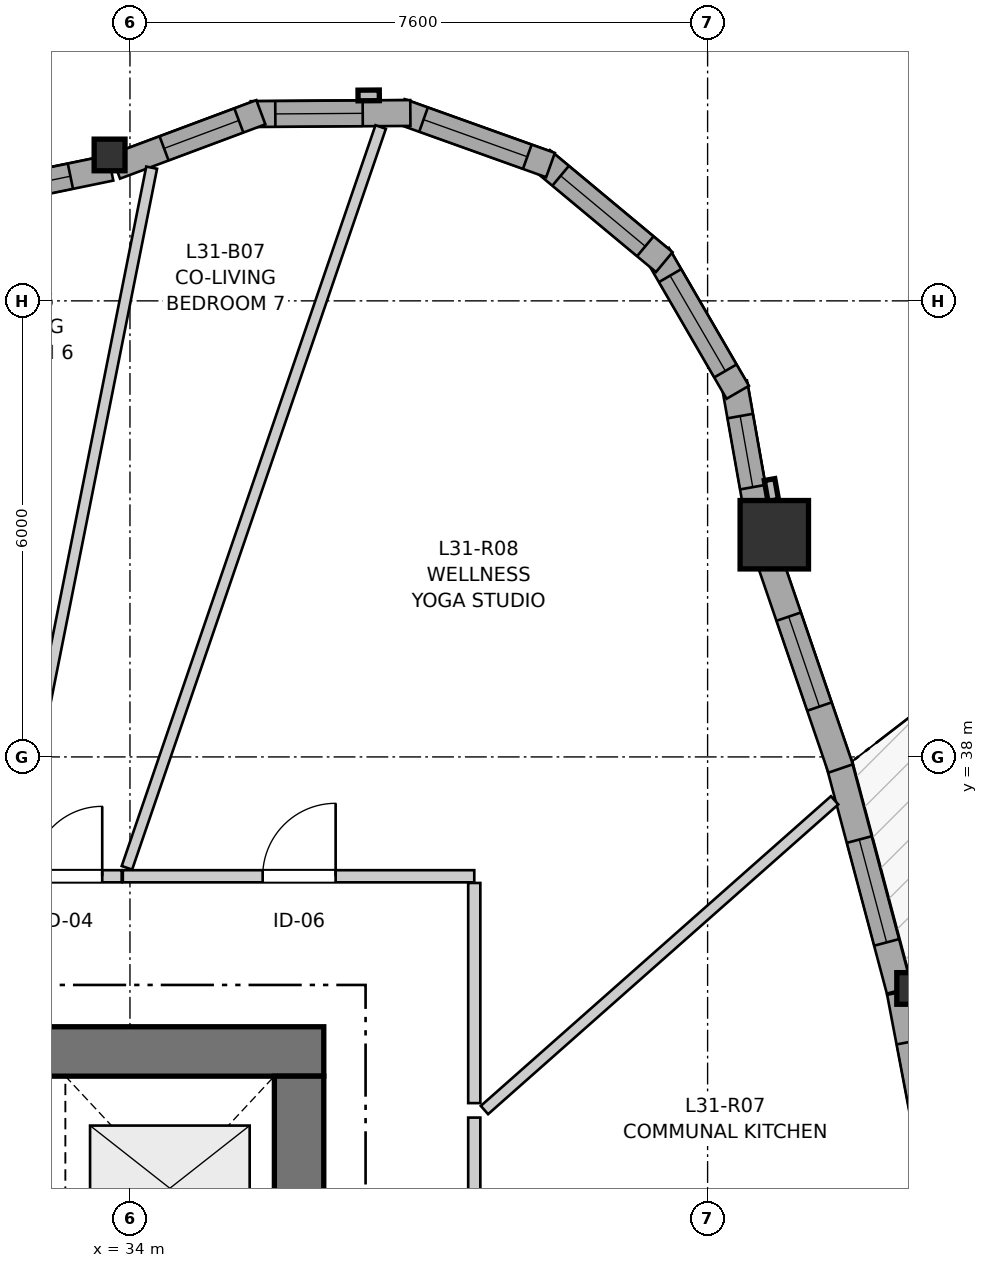
"""IFC4 building model, lengths in metres.
Left out: names, types, materials, properties, quantities, classifications, styles, units other than length and angle.
Written with IfcOpenShell. Run it as: python <this file> out.ifc"""

import sys

from ifc_helpers import new_model, si_unit, direction, frame, frame_2d, origin, origin_2d, place, context, subcontext, project, spatial, rectangle, i_section, extrude, source, transform, mapped, element, fill, save


model = new_model("IFC4")
c1 = context("Model", 3, precision=1e-05, world=origin(), true_north=direction((0.0, 1.0)))
c2 = subcontext(c1, "Body", "Model", "MODEL_VIEW")
j1 = project(units=[si_unit("LENGTHUNIT", "METRE"), si_unit("PLANEANGLEUNIT", "RADIAN")], contexts=[c1])
p1 = place(None, origin())
s1 = spatial("IfcSite", under=j1, at=p1, CompositionType="ELEMENT")
p2 = place(p1, origin())
s2 = spatial("IfcBuilding", under=s1, at=p2, CompositionType="ELEMENT")
p3 = place(p2, frame((0.0, 0.0, 105.6)))
s3 = spatial("IfcBuildingStorey", under=s2, at=p3, CompositionType="ELEMENT", Elevation=105.6)
p4 = place(p3, frame((36.55, 34.125, 0.0), z_axis=(0.0, 0.0, 1.0), x_axis=(-1.0, 0.0, 0.0)))
e1 = element("IfcWall", 1, at=p4, inside=s3, PredefinedType="SHEAR", context=c2, shape_type="SweptSolid", body=[
    extrude(rectangle(XDim=12.4, YDim=0.65, at=frame_2d((6.2, 0.0))), origin(), (0.0, 0.0, 1.0), 2.935),
])
p5 = place(p3, frame((36.225, 18.2, 0.0), z_axis=(0.0, 0.0, 1.0), x_axis=(0.0, 1.0, 0.0)))
e2 = element("IfcWall", 2, at=p5, inside=s3, PredefinedType="SHEAR", context=c2, shape_type="SweptSolid", body=[
    extrude(rectangle(XDim=15.6, YDim=0.65, at=frame_2d((7.8, 0.0))), origin(), (0.0, 0.0, 1.0), 2.935),
])
p6 = place(p5, frame((4.25, 0.0, 0.0)))
e3 = element("IfcOpeningElement", 3, at=p6, cuts=e2, PredefinedType="OPENING", context=c2, shape_type="SweptSolid", body=[
    extrude(rectangle(XDim=1.1, YDim=2.15, at=frame_2d((0.55, 1.075))), frame((0.0, 0.335, 0.0), z_axis=(0.0, -1.0, 0.0), x_axis=(1.0, 0.0, 0.0)), (0.0, 0.0, 1.0), 0.67),
])
p7 = place(p5, frame((10.25, 0.0, 0.0)))
e4 = element("IfcOpeningElement", 4, at=p7, cuts=e2, PredefinedType="OPENING", context=c2, shape_type="SweptSolid", body=[
    extrude(rectangle(XDim=1.1, YDim=2.15, at=frame_2d((0.55, 1.075))), frame((0.0, 0.335, 0.0), z_axis=(0.0, -1.0, 0.0), x_axis=(1.0, 0.0, 0.0)), (0.0, 0.0, 1.0), 0.67),
])
m1 = source(origin(), c2, "Body", "SweptSolid", [
    extrude(i_section(OverallWidth=0.406, OverallDepth=0.416, WebThickness=0.027, FlangeThickness=0.044, FilletRadius=0.015, at=origin_2d()), origin(), (0.0, 0.0, 1.0), 2.935),
])
p8 = place(p3, frame((44.292, 34.954, 0.0), z_axis=(0.0, 0.0, 1.0), x_axis=(1.0, 0.0, 0.0)))
e5 = element("IfcColumn", 5, at=p8, inside=s3, PredefinedType="PILASTER", context=c2, shape_type="MappedRepresentation", body=[
    mapped(m1, transform((0.0, 0.0, 0.0), x_axis=(1.0, 0.0, 0.0), y_axis=(0.0, 1.0, 0.0), z_axis=(0.0, 0.0, 1.0), scale=1.0)),
])
m2 = source(origin(), c2, "Body", "SweptSolid", [
    extrude(rectangle(XDim=0.9, YDim=0.9, at=origin_2d()), origin(), (0.0, 0.0, 1.0), 2.935),
])
p9 = place(p3, frame((42.478, 40.923, 0.0), z_axis=(0.0, 0.0, 1.0), x_axis=(1.0, 0.0, 0.0)))
e6 = element("IfcColumn", 6, at=p9, inside=s3, PredefinedType="COLUMN", context=c2, shape_type="MappedRepresentation", body=[
    mapped(m2, transform((0.0, 0.0, 0.0), x_axis=(1.0, 0.0, 0.0), y_axis=(0.0, 1.0, 0.0), z_axis=(0.0, 0.0, 1.0), scale=1.0)),
])
p10 = place(p3, frame((33.732, 45.92, 0.0), z_axis=(0.0, 0.0, 1.0), x_axis=(1.0, 0.0, 0.0)))
e7 = element("IfcColumn", 7, at=p10, inside=s3, PredefinedType="PILASTER", context=c2, shape_type="MappedRepresentation", body=[
    mapped(m1, transform((0.0, 0.0, 0.0), x_axis=(1.0, 0.0, 0.0), y_axis=(0.0, 1.0, 0.0), z_axis=(0.0, 0.0, 1.0), scale=1.0)),
])
p11 = place(p3, frame((44.699, 31.9, 0.0), z_axis=(0.0, 0.0, 1.0), x_axis=(-0.186689944156, 0.982418884566, 0.0)))
e8 = element("IfcWall", 8, at=p11, inside=s3, PredefinedType="SOLIDWALL", context=c2, shape_type="SweptSolid", body=[
    extrude(rectangle(XDim=3.056, YDim=0.34, at=frame_2d((1.528, 0.0))), origin(), (0.0, 0.0, 1.0), 2.465),
])
p12 = place(p11, frame((0.791, 0.0, 0.82)))
e9 = element("IfcOpeningElement", 9, at=p12, cuts=e8, PredefinedType="OPENING", context=c2, shape_type="SweptSolid", body=[
    extrude(rectangle(XDim=1.6, YDim=1.35, at=frame_2d((0.8, 0.675))), frame((0.0, 0.18, 0.0), z_axis=(0.0, -1.0, 0.0), x_axis=(1.0, 0.0, 0.0)), (0.0, 0.0, 1.0), 0.36),
])
p13 = place(p3, frame((44.123, 34.93, 0.0), z_axis=(0.0, 0.0, 1.0), x_axis=(-0.257080487516, 0.96638999526, 0.0)))
e10 = element("IfcWall", 10, at=p13, inside=s3, PredefinedType="SOLIDWALL", context=c2, shape_type="SweptSolid", body=[
    extrude(rectangle(XDim=3.106, YDim=0.34, at=frame_2d((1.553, 0.0))), origin(), (0.0, 0.0, 1.0), 2.465),
])
p14 = place(p13, frame((0.652, 0.0, 0.82)))
e11 = element("IfcOpeningElement", 11, at=p14, cuts=e10, PredefinedType="OPENING", context=c2, shape_type="SweptSolid", body=[
    extrude(rectangle(XDim=1.4, YDim=1.35, at=frame_2d((0.7, 0.675))), frame((0.0, 0.18, 0.0), z_axis=(0.0, -1.0, 0.0), x_axis=(1.0, 0.0, 0.0)), (0.0, 0.0, 1.0), 0.36),
])
p15 = place(p3, frame((43.35, 37.848, 0.0), z_axis=(0.0, 0.0, 1.0), x_axis=(-0.323561473353, 0.946207151189, 0.0)))
e12 = element("IfcWall", 12, at=p15, inside=s3, PredefinedType="SOLIDWALL", context=c2, shape_type="SweptSolid", body=[
    extrude(rectangle(XDim=2.962, YDim=0.34, at=frame_2d((1.481, 0.0))), origin(), (0.0, 0.0, 1.0), 2.465),
])
p16 = place(p15, frame((0.861, 0.0, 0.82)))
e13 = element("IfcOpeningElement", 13, at=p16, cuts=e12, PredefinedType="OPENING", context=c2, shape_type="SweptSolid", body=[
    extrude(rectangle(XDim=1.25, YDim=1.35, at=frame_2d((0.625, 0.675))), frame((0.0, 0.18, 0.0), z_axis=(0.0, -1.0, 0.0), x_axis=(1.0, 0.0, 0.0)), (0.0, 0.0, 1.0), 0.36),
])
p17 = place(p3, frame((42.27, 41.12, 0.0), z_axis=(0.0, 0.0, 1.0), x_axis=(-0.17440141227, 0.984674640375, 0.0)))
e14 = element("IfcWall", 14, at=p17, inside=s3, PredefinedType="SOLIDWALL", context=c2, shape_type="SweptSolid", body=[
    extrude(rectangle(XDim=1.831, YDim=0.34, at=frame_2d((0.916, 0.0))), origin(), (0.0, 0.0, 1.0), 2.465),
])
p18 = place(p17, frame((0.436, 0.0, 0.82)))
e15 = element("IfcOpeningElement", 15, at=p18, cuts=e14, PredefinedType="OPENING", context=c2, shape_type="SweptSolid", body=[
    extrude(rectangle(XDim=0.95, YDim=1.35, at=frame_2d((0.475, 0.675))), frame((0.0, 0.18, 0.0), z_axis=(0.0, -1.0, 0.0), x_axis=(1.0, 0.0, 0.0)), (0.0, 0.0, 1.0), 0.36),
])
p19 = place(p3, frame((41.997, 42.797, 0.0), z_axis=(0.0, 0.0, 1.0), x_axis=(-0.501902596059, 0.864924149315, 0.0)))
e16 = element("IfcWall", 16, at=p19, inside=s3, PredefinedType="SOLIDWALL", context=c2, shape_type="SweptSolid", body=[
    extrude(rectangle(XDim=2.099, YDim=0.34, at=frame_2d((1.049, 0.0))), origin(), (0.0, 0.0, 1.0), 2.465),
])
p20 = place(p19, frame((0.324, 0.0, 0.82)))
e17 = element("IfcOpeningElement", 17, at=p20, cuts=e16, PredefinedType="OPENING", context=c2, shape_type="SweptSolid", body=[
    extrude(rectangle(XDim=1.45, YDim=1.25, at=frame_2d((0.725, 0.625))), frame((0.0, 0.18, 0.0), z_axis=(0.0, -1.0, 0.0), x_axis=(1.0, 0.0, 0.0)), (0.0, 0.0, 1.0), 0.36),
])
p21 = place(p3, frame((41.03, 44.51, 0.0), z_axis=(0.0, 0.0, 1.0), x_axis=(-0.768497696041, 0.639852554249, 0.0)))
e18 = element("IfcWall", 18, at=p21, inside=s3, PredefinedType="SOLIDWALL", context=c2, shape_type="SweptSolid", body=[
    extrude(rectangle(XDim=2.099, YDim=0.34, at=frame_2d((1.049, 0.0))), origin(), (0.0, 0.0, 1.0), 2.465),
])
p22 = place(p21, frame((0.324, 0.0, 0.82)))
e19 = element("IfcOpeningElement", 19, at=p22, cuts=e18, PredefinedType="OPENING", context=c2, shape_type="SweptSolid", body=[
    extrude(rectangle(XDim=1.45, YDim=1.25, at=frame_2d((0.725, 0.625))), frame((0.0, 0.18, 0.0), z_axis=(0.0, -1.0, 0.0), x_axis=(1.0, 0.0, 0.0)), (0.0, 0.0, 1.0), 0.36),
])
p23 = place(p3, frame((39.533, 45.787, 0.0), z_axis=(0.0, 0.0, 1.0), x_axis=(-0.941523304278, 0.336947870598, 0.0)))
e20 = element("IfcWall", 20, at=p23, inside=s3, PredefinedType="SOLIDWALL", context=c2, shape_type="SweptSolid", body=[
    extrude(rectangle(XDim=2.099, YDim=0.34, at=frame_2d((1.05, 0.0))), origin(), (0.0, 0.0, 1.0), 2.465),
])
p24 = place(p23, frame((0.324, 0.0, 0.82)))
e21 = element("IfcOpeningElement", 21, at=p24, cuts=e20, PredefinedType="OPENING", context=c2, shape_type="SweptSolid", body=[
    extrude(rectangle(XDim=1.45, YDim=1.25, at=frame_2d((0.725, 0.625))), frame((0.0, 0.18, 0.0), z_axis=(0.0, -1.0, 0.0), x_axis=(1.0, 0.0, 0.0)), (0.0, 0.0, 1.0), 0.36),
])
p25 = place(p3, frame((37.689, 46.471, 0.0), z_axis=(0.0, 0.0, 1.0), x_axis=(-0.999976456891, -0.00686189939, 0.0)))
e22 = element("IfcWall", 22, at=p25, inside=s3, PredefinedType="SOLIDWALL", context=c2, shape_type="SweptSolid", body=[
    extrude(rectangle(XDim=2.099, YDim=0.34, at=frame_2d((1.05, 0.0))), origin(), (0.0, 0.0, 1.0), 2.465),
])
p26 = place(p25, frame((0.627, 0.0, 0.82)))
e23 = element("IfcOpeningElement", 23, at=p26, cuts=e22, PredefinedType="OPENING", context=c2, shape_type="SweptSolid", body=[
    extrude(rectangle(XDim=1.15, YDim=1.2, at=frame_2d((0.575, 0.6))), frame((0.0, 0.18, 0.0), z_axis=(0.0, -1.0, 0.0), x_axis=(1.0, 0.0, 0.0)), (0.0, 0.0, 1.0), 0.36),
])
p27 = place(p3, frame((35.722, 46.481, 0.0), z_axis=(0.0, 0.0, 1.0), x_axis=(-0.9368002254, -0.349864741994, 0.0)))
e24 = element("IfcWall", 24, at=p27, inside=s3, PredefinedType="SOLIDWALL", context=c2, shape_type="SweptSolid", body=[
    extrude(rectangle(XDim=2.041, YDim=0.34, at=frame_2d((1.021, 0.0))), origin(), (0.0, 0.0, 1.0), 2.465),
])
p28 = place(p27, frame((0.309, 0.0, 0.82)))
e25 = element("IfcOpeningElement", 25, at=p28, cuts=e24, PredefinedType="OPENING", context=c2, shape_type="SweptSolid", body=[
    extrude(rectangle(XDim=1.05, YDim=1.45, at=frame_2d((0.525, 0.725))), frame((0.0, 0.18, 0.0), z_axis=(0.0, -1.0, 0.0), x_axis=(1.0, 0.0, 0.0)), (0.0, 0.0, 1.0), 0.36),
])
p29 = place(p3, frame((33.747, 45.749, 0.0), z_axis=(0.0, 0.0, 1.0), x_axis=(-0.979440240026, -0.201734519153, 0.0)))
e26 = element("IfcWall", 26, at=p29, inside=s3, PredefinedType="SOLIDWALL", context=c2, shape_type="SweptSolid", body=[
    extrude(rectangle(XDim=3.124, YDim=0.34, at=frame_2d((1.562, 0.0))), origin(), (0.0, 0.0, 1.0), 2.465),
])
p30 = place(p29, frame((0.541, 0.0, 0.82)))
e27 = element("IfcOpeningElement", 27, at=p30, cuts=e26, PredefinedType="OPENING", context=c2, shape_type="SweptSolid", body=[
    extrude(rectangle(XDim=1.65, YDim=1.45, at=frame_2d((0.825, 0.725))), frame((0.0, 0.18, 0.0), z_axis=(0.0, -1.0, 0.0), x_axis=(1.0, 0.0, 0.0)), (0.0, 0.0, 1.0), 0.36),
])
p31 = place(p3, frame((33.906, 36.43, 0.0), z_axis=(0.0, 0.0, 1.0), x_axis=(1.0, 0.0, 0.0)))
e28 = element("IfcWall", 28, at=p31, inside=s3, PredefinedType="PARTITIONING", context=c2, shape_type="SweptSolid", body=[
    extrude(rectangle(XDim=4.624, YDim=0.16, at=frame_2d((2.312, 0.0))), origin(), (0.0, 0.0, 1.0), 2.573),
])
p32 = place(p31, frame((1.84, 0.0, 0.0)))
e29 = element("IfcOpeningElement", 29, at=p32, cuts=e28, PredefinedType="OPENING", context=c2, shape_type="SweptSolid", body=[
    extrude(rectangle(XDim=0.96, YDim=2.1, at=frame_2d((0.48, 1.05))), frame((0.0, 0.09, 0.0), z_axis=(0.0, -1.0, 0.0), x_axis=(1.0, 0.0, 0.0)), (0.0, 0.0, 1.0), 0.18),
])
p33 = place(p3, frame((38.53, 33.255, 0.0), z_axis=(0.0, 0.0, 1.0), x_axis=(0.0, -1.0, 0.0)))
e30 = element("IfcWall", 30, at=p33, inside=s3, PredefinedType="PARTITIONING", context=c2, shape_type="SweptSolid", body=[
    extrude(rectangle(XDim=3.726, YDim=0.16, at=frame_2d((1.863, 0.0))), origin(), (0.0, 0.0, 1.0), 2.935),
])
p34 = place(p33, frame((1.239, 0.0, 0.0)))
e31 = element("IfcOpeningElement", 31, at=p34, cuts=e30, PredefinedType="OPENING", context=c2, shape_type="SweptSolid", body=[
    extrude(rectangle(XDim=1.3, YDim=2.1, at=frame_2d((0.65, 1.05))), frame((0.0, 0.09, 0.0), z_axis=(0.0, -1.0, 0.0), x_axis=(1.0, 0.0, 0.0)), (0.0, 0.0, 1.0), 0.18),
])
p35 = place(p3, frame((32.458, 36.43, 0.0), z_axis=(0.0, 0.0, 1.0), x_axis=(1.0, 0.0, 0.0)))
e32 = element("IfcWall", 32, at=p35, inside=s3, PredefinedType="PARTITIONING", context=c2, shape_type="SweptSolid", body=[
    extrude(rectangle(XDim=1.433, YDim=0.16, at=frame_2d((0.717, 0.0))), origin(), (0.0, 0.0, 1.0), 2.935),
])
p36 = place(p35, frame((0.257, 0.0, 0.0)))
e33 = element("IfcOpeningElement", 33, at=p36, cuts=e32, PredefinedType="OPENING", context=c2, shape_type="SweptSolid", body=[
    extrude(rectangle(XDim=0.92, YDim=2.1, at=frame_2d((0.46, 1.05))), frame((0.0, 0.09, 0.0), z_axis=(0.0, -1.0, 0.0), x_axis=(1.0, 0.0, 0.0)), (0.0, 0.0, 1.0), 0.18),
])
p37 = place(p3, frame((33.96, 36.541, 0.0), z_axis=(0.0, 0.0, 1.0), x_axis=(0.324058346196, 0.946037096662, 0.0)))
e34 = element("IfcWall", 34, at=p37, inside=s3, PredefinedType="PARTITIONING", context=c2, shape_type="SweptSolid", body=[
    extrude(rectangle(XDim=10.302, YDim=0.145, at=frame_2d((5.151, 0.0))), origin(), (0.0, 0.0, 1.0), 2.935),
])
p38 = place(p3, frame((32.448, 36.532, 0.0), z_axis=(0.0, 0.0, 1.0), x_axis=(0.195406965811, 0.980722242897, 0.0)))
e35 = element("IfcWall", 35, at=p38, inside=s3, PredefinedType="PARTITIONING", context=c2, shape_type="SweptSolid", body=[
    extrude(rectangle(XDim=9.402, YDim=0.145, at=frame_2d((4.701, 0.0))), origin(), (0.0, 0.0, 1.0), 2.935),
])
p39 = place(p3, frame((38.664, 33.354, 0.0), z_axis=(0.0, 0.0, 1.0), x_axis=(0.749069296105, 0.662491652501, 0.0)))
e36 = element("IfcWall", 36, at=p39, inside=s3, PredefinedType="PARTITIONING", context=c2, shape_type="SweptSolid", body=[
    extrude(rectangle(XDim=6.15, YDim=0.145, at=frame_2d((3.075, 0.0))), origin(), (0.0, 0.0, 1.0), 2.935),
])
p40 = place(p3, frame((38.53, 33.446, 0.0), z_axis=(0.0, 0.0, 1.0), x_axis=(0.0, 1.0, 0.0)))
e37 = element("IfcWall", 37, at=p40, inside=s3, PredefinedType="PARTITIONING", context=c2, shape_type="SweptSolid", body=[
    extrude(rectangle(XDim=2.896, YDim=0.16, at=frame_2d((1.448, 0.0))), origin(), (0.0, 0.0, 1.0), 2.573),
])
m3 = source(origin(), c2, "Body", "SweptSolid", [
    extrude(rectangle(XDim=1.6, YDim=1.35, at=frame_2d((0.8, 0.675))), frame((0.0, 0.03, 0.0), z_axis=(0.0, -1.0, 0.0), x_axis=(1.0, 0.0, 0.0)), (0.0, 0.0, 1.0), 0.06),
])
p41 = place(p12, origin())
e38 = element("IfcWindow", 38, at=p41, inside=s3, PartitioningType="SINGLE_PANEL", PredefinedType="WINDOW", context=c2, shape_type="MappedRepresentation", body=[
    mapped(m3, transform((0.0, 0.0, 0.0), x_axis=(1.0, 0.0, 0.0), y_axis=(0.0, 1.0, 0.0), z_axis=(0.0, 0.0, 1.0), scale=1.0)),
])
fill(e9, e38)
m4 = source(origin(), c2, "Body", "SweptSolid", [
    extrude(rectangle(XDim=1.4, YDim=1.35, at=frame_2d((0.7, 0.675))), frame((0.0, 0.03, 0.0), z_axis=(0.0, -1.0, 0.0), x_axis=(1.0, 0.0, 0.0)), (0.0, 0.0, 1.0), 0.06),
])
p42 = place(p14, origin())
e39 = element("IfcWindow", 39, at=p42, inside=s3, PartitioningType="SINGLE_PANEL", PredefinedType="WINDOW", context=c2, shape_type="MappedRepresentation", body=[
    mapped(m4, transform((0.0, 0.0, 0.0), x_axis=(1.0, 0.0, 0.0), y_axis=(0.0, 1.0, 0.0), z_axis=(0.0, 0.0, 1.0), scale=1.0)),
])
fill(e11, e39)
m5 = source(origin(), c2, "Body", "SweptSolid", [
    extrude(rectangle(XDim=1.25, YDim=1.35, at=frame_2d((0.625, 0.675))), frame((0.0, 0.03, 0.0), z_axis=(0.0, -1.0, 0.0), x_axis=(1.0, 0.0, 0.0)), (0.0, 0.0, 1.0), 0.06),
])
p43 = place(p16, origin())
e40 = element("IfcWindow", 40, at=p43, inside=s3, PartitioningType="SINGLE_PANEL", PredefinedType="WINDOW", context=c2, shape_type="MappedRepresentation", body=[
    mapped(m5, transform((0.0, 0.0, 0.0), x_axis=(1.0, 0.0, 0.0), y_axis=(0.0, 1.0, 0.0), z_axis=(0.0, 0.0, 1.0), scale=1.0)),
])
fill(e13, e40)
m6 = source(origin(), c2, "Body", "SweptSolid", [
    extrude(rectangle(XDim=0.95, YDim=1.35, at=frame_2d((0.475, 0.675))), frame((0.0, 0.03, 0.0), z_axis=(0.0, -1.0, 0.0), x_axis=(1.0, 0.0, 0.0)), (0.0, 0.0, 1.0), 0.06),
])
p44 = place(p18, origin())
e41 = element("IfcWindow", 41, at=p44, inside=s3, PartitioningType="SINGLE_PANEL", PredefinedType="WINDOW", context=c2, shape_type="MappedRepresentation", body=[
    mapped(m6, transform((0.0, 0.0, 0.0), x_axis=(1.0, 0.0, 0.0), y_axis=(0.0, 1.0, 0.0), z_axis=(0.0, 0.0, 1.0), scale=1.0)),
])
fill(e15, e41)
m7 = source(origin(), c2, "Body", "SweptSolid", [
    extrude(rectangle(XDim=1.45, YDim=1.25, at=frame_2d((0.725, 0.625))), frame((0.0, 0.03, 0.0), z_axis=(0.0, -1.0, 0.0), x_axis=(1.0, 0.0, 0.0)), (0.0, 0.0, 1.0), 0.06),
])
p45 = place(p20, origin())
e42 = element("IfcWindow", 42, at=p45, inside=s3, PartitioningType="SINGLE_PANEL", PredefinedType="WINDOW", context=c2, shape_type="MappedRepresentation", body=[
    mapped(m7, transform((0.0, 0.0, 0.0), x_axis=(1.0, 0.0, 0.0), y_axis=(0.0, 1.0, 0.0), z_axis=(0.0, 0.0, 1.0), scale=1.0)),
])
fill(e17, e42)
p46 = place(p22, origin())
e43 = element("IfcWindow", 43, at=p46, inside=s3, PartitioningType="SINGLE_PANEL", PredefinedType="WINDOW", context=c2, shape_type="MappedRepresentation", body=[
    mapped(m7, transform((0.0, 0.0, 0.0), x_axis=(1.0, 0.0, 0.0), y_axis=(0.0, 1.0, 0.0), z_axis=(0.0, 0.0, 1.0), scale=1.0)),
])
fill(e19, e43)
p47 = place(p24, origin())
e44 = element("IfcWindow", 44, at=p47, inside=s3, PartitioningType="SINGLE_PANEL", PredefinedType="WINDOW", context=c2, shape_type="MappedRepresentation", body=[
    mapped(m7, transform((0.0, 0.0, 0.0), x_axis=(1.0, 0.0, 0.0), y_axis=(0.0, 1.0, 0.0), z_axis=(0.0, 0.0, 1.0), scale=1.0)),
])
fill(e21, e44)
m8 = source(origin(), c2, "Body", "SweptSolid", [
    extrude(rectangle(XDim=1.15, YDim=1.2, at=frame_2d((0.575, 0.6))), frame((0.0, 0.03, 0.0), z_axis=(0.0, -1.0, 0.0), x_axis=(1.0, 0.0, 0.0)), (0.0, 0.0, 1.0), 0.06),
])
p48 = place(p26, origin())
e45 = element("IfcWindow", 45, at=p48, inside=s3, PartitioningType="SINGLE_PANEL", PredefinedType="WINDOW", context=c2, shape_type="MappedRepresentation", body=[
    mapped(m8, transform((0.0, 0.0, 0.0), x_axis=(1.0, 0.0, 0.0), y_axis=(0.0, 1.0, 0.0), z_axis=(0.0, 0.0, 1.0), scale=1.0)),
])
fill(e23, e45)
m9 = source(origin(), c2, "Body", "SweptSolid", [
    extrude(rectangle(XDim=1.05, YDim=1.45, at=frame_2d((0.525, 0.725))), frame((0.0, 0.03, 0.0), z_axis=(0.0, -1.0, 0.0), x_axis=(1.0, 0.0, 0.0)), (0.0, 0.0, 1.0), 0.06),
])
p49 = place(p28, origin())
e46 = element("IfcWindow", 46, at=p49, inside=s3, PartitioningType="SINGLE_PANEL", PredefinedType="WINDOW", context=c2, shape_type="MappedRepresentation", body=[
    mapped(m9, transform((0.0, 0.0, 0.0), x_axis=(1.0, 0.0, 0.0), y_axis=(0.0, 1.0, 0.0), z_axis=(0.0, 0.0, 1.0), scale=1.0)),
])
fill(e25, e46)
m10 = source(origin(), c2, "Body", "SweptSolid", [
    extrude(rectangle(XDim=1.65, YDim=1.45, at=frame_2d((0.825, 0.725))), frame((0.0, 0.03, 0.0), z_axis=(0.0, -1.0, 0.0), x_axis=(1.0, 0.0, 0.0)), (0.0, 0.0, 1.0), 0.06),
])
p50 = place(p30, origin())
e47 = element("IfcWindow", 47, at=p50, inside=s3, PartitioningType="SINGLE_PANEL", PredefinedType="WINDOW", context=c2, shape_type="MappedRepresentation", body=[
    mapped(m10, transform((0.0, 0.0, 0.0), x_axis=(1.0, 0.0, 0.0), y_axis=(0.0, 1.0, 0.0), z_axis=(0.0, 0.0, 1.0), scale=1.0)),
])
fill(e27, e47)
m11 = source(origin(), c2, "Body", "SweptSolid", [
    extrude(rectangle(XDim=0.96, YDim=2.1, at=frame_2d((0.48, 1.05))), frame((0.0, 0.025, 0.0), z_axis=(0.0, -1.0, 0.0), x_axis=(1.0, 0.0, 0.0)), (0.0, 0.0, 1.0), 0.05),
])
p51 = place(p32, origin())
e48 = element("IfcDoor", 48, at=p51, inside=s3, OperationType="SINGLE_SWING_RIGHT", PredefinedType="DOOR", context=c2, shape_type="MappedRepresentation", body=[
    mapped(m11, transform((0.0, 0.0, 0.0), x_axis=(1.0, 0.0, 0.0), y_axis=(0.0, 1.0, 0.0), z_axis=(0.0, 0.0, 1.0), scale=1.0)),
])
fill(e29, e48)
m12 = source(origin(), c2, "Body", "SweptSolid", [
    extrude(rectangle(XDim=0.92, YDim=2.1, at=frame_2d((0.46, 1.05))), frame((0.0, 0.025, 0.0), z_axis=(0.0, -1.0, 0.0), x_axis=(1.0, 0.0, 0.0)), (0.0, 0.0, 1.0), 0.05),
])
p52 = place(p36, origin())
e49 = element("IfcDoor", 49, at=p52, inside=s3, OperationType="SINGLE_SWING_RIGHT", PredefinedType="DOOR", context=c2, shape_type="MappedRepresentation", body=[
    mapped(m12, transform((0.0, 0.0, 0.0), x_axis=(1.0, 0.0, 0.0), y_axis=(0.0, 1.0, 0.0), z_axis=(0.0, 0.0, 1.0), scale=1.0)),
])
fill(e33, e49)
save(model, sys.argv[1])
